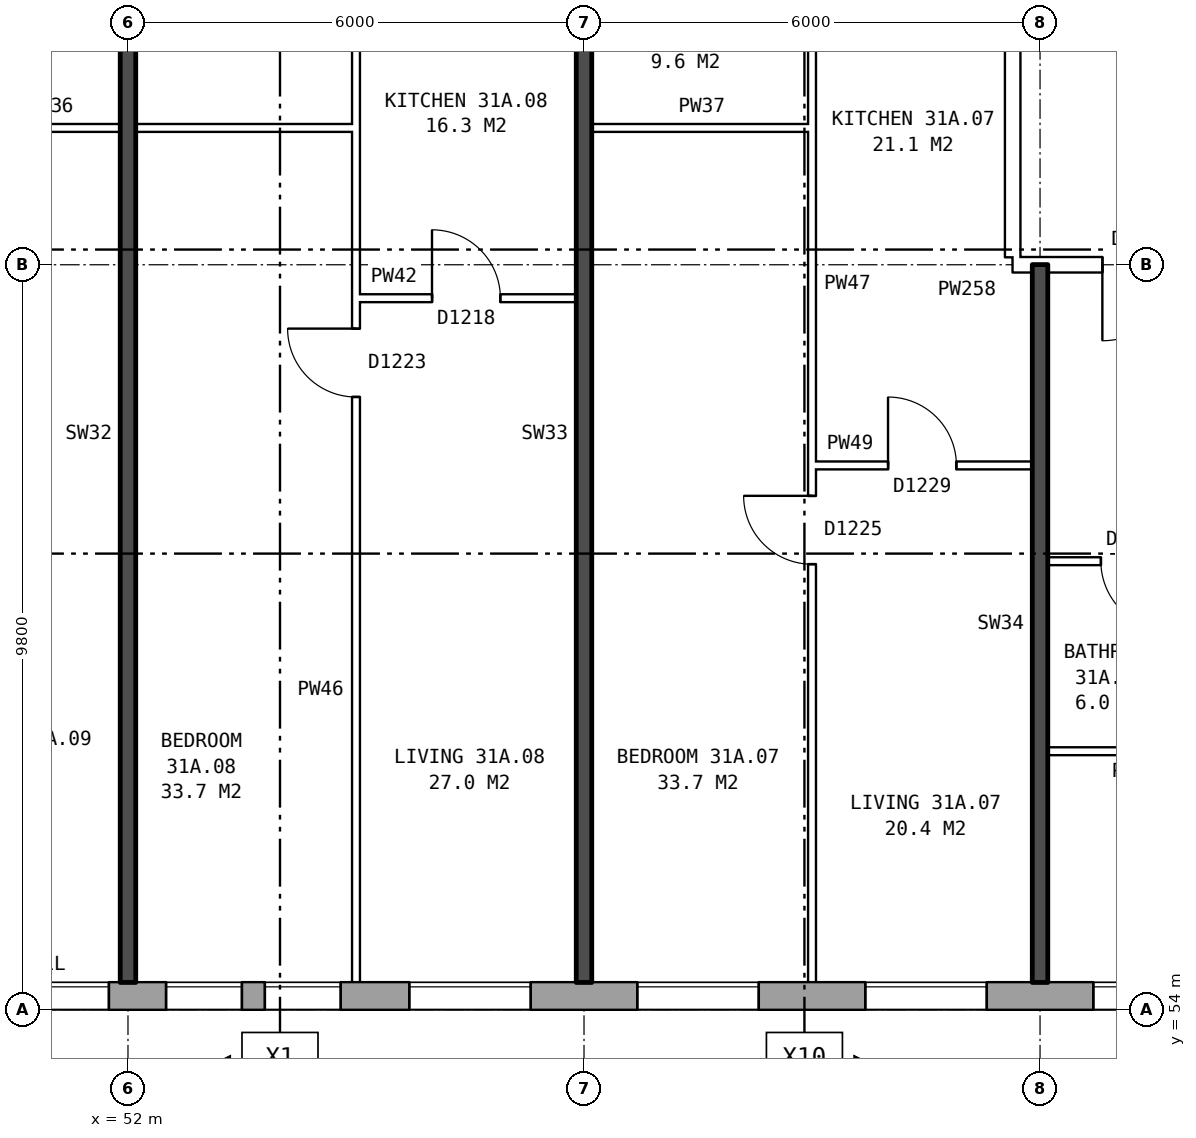
"""IFC4 building model, lengths in metres.
Left out: names, types, materials, properties, quantities, classifications, styles, units other than length and angle.
Written with IfcOpenShell. Run it as: python <this file> out.ifc"""

import sys

from ifc_helpers import new_model, si_unit, direction, frame, frame_2d, origin, place, context, subcontext, project, spatial, rectangle, extrude, element, fill, save


model = new_model("IFC4")
c1 = context("Model", 3, precision=1e-05, world=origin(), true_north=direction((0.0, 1.0)))
c2 = subcontext(c1, "Body", "Model", "MODEL_VIEW")
j1 = project(units=[si_unit("LENGTHUNIT", "METRE"), si_unit("PLANEANGLEUNIT", "RADIAN")], contexts=[c1])
p1 = place(None, origin())
s1 = spatial("IfcSite", under=j1, at=p1, CompositionType="ELEMENT")
p2 = place(p1, origin())
s2 = spatial("IfcBuilding", under=s1, at=p2, CompositionType="ELEMENT")
p3 = place(p2, frame((0.0, 0.0, 111.9)))
s3 = spatial("IfcBuildingStorey", under=s2, at=p3, CompositionType="ELEMENT", Elevation=111.9)
p4 = place(p3, frame((28.075, 54.18, 0.0), z_axis=(0.0, 0.0, 1.0), x_axis=(1.0, 0.0, 0.0)))
e1 = element("IfcWall", 1, at=p4, inside=s3, PredefinedType="STANDARD", context=c2, shape_type="SweptSolid", body=[
    extrude(rectangle(XDim=44.851, YDim=0.36, at=frame_2d((22.425, 0.0))), origin(), (0.0, 0.0, 1.0), 2.85),
])
p5 = place(p4, frame((0.625, 0.0, 0.8)))
e2 = element("IfcOpeningElement", 2, at=p5, cuts=e1, PredefinedType="OPENING", context=c2, shape_type="SweptSolid", body=[
    extrude(rectangle(XDim=1.6, YDim=1.8, at=frame_2d((0.8, 0.9))), frame((0.0, 0.19, 0.0), z_axis=(0.0, -1.0, 0.0), x_axis=(1.0, 0.0, 0.0)), (0.0, 0.0, 1.0), 0.38),
])
p6 = place(p4, frame((3.625, 0.0, 0.8)))
e3 = element("IfcOpeningElement", 3, at=p6, cuts=e1, PredefinedType="OPENING", context=c2, shape_type="SweptSolid", body=[
    extrude(rectangle(XDim=1.6, YDim=1.8, at=frame_2d((0.8, 0.9))), frame((0.0, 0.19, 0.0), z_axis=(0.0, -1.0, 0.0), x_axis=(1.0, 0.0, 0.0)), (0.0, 0.0, 1.0), 0.38),
])
p7 = place(p4, frame((6.625, 0.0, 0.8)))
e4 = element("IfcOpeningElement", 4, at=p7, cuts=e1, PredefinedType="OPENING", context=c2, shape_type="SweptSolid", body=[
    extrude(rectangle(XDim=1.6, YDim=1.8, at=frame_2d((0.8, 0.9))), frame((0.0, 0.19, 0.0), z_axis=(0.0, -1.0, 0.0), x_axis=(1.0, 0.0, 0.0)), (0.0, 0.0, 1.0), 0.38),
])
p8 = place(p4, frame((9.625, 0.0, 0.8)))
e5 = element("IfcOpeningElement", 5, at=p8, cuts=e1, PredefinedType="OPENING", context=c2, shape_type="SweptSolid", body=[
    extrude(rectangle(XDim=1.6, YDim=1.8, at=frame_2d((0.8, 0.9))), frame((0.0, 0.19, 0.0), z_axis=(0.0, -1.0, 0.0), x_axis=(1.0, 0.0, 0.0)), (0.0, 0.0, 1.0), 0.38),
])
p9 = place(p4, frame((12.625, 0.0, 0.8)))
e6 = element("IfcOpeningElement", 6, at=p9, cuts=e1, PredefinedType="OPENING", context=c2, shape_type="SweptSolid", body=[
    extrude(rectangle(XDim=1.6, YDim=1.8, at=frame_2d((0.8, 0.9))), frame((0.0, 0.19, 0.0), z_axis=(0.0, -1.0, 0.0), x_axis=(1.0, 0.0, 0.0)), (0.0, 0.0, 1.0), 0.38),
])
p10 = place(p4, frame((15.625, 0.0, 0.8)))
e7 = element("IfcOpeningElement", 7, at=p10, cuts=e1, PredefinedType="OPENING", context=c2, shape_type="SweptSolid", body=[
    extrude(rectangle(XDim=1.6, YDim=1.8, at=frame_2d((0.8, 0.9))), frame((0.0, 0.19, 0.0), z_axis=(0.0, -1.0, 0.0), x_axis=(1.0, 0.0, 0.0)), (0.0, 0.0, 1.0), 0.38),
])
p11 = place(p4, frame((18.125, 0.0, 0.8)))
e8 = element("IfcOpeningElement", 8, at=p11, cuts=e1, PredefinedType="OPENING", context=c2, shape_type="SweptSolid", body=[
    extrude(rectangle(XDim=1.0, YDim=1.8, at=frame_2d((0.5, 0.9))), frame((0.0, 0.19, 0.0), z_axis=(0.0, -1.0, 0.0), x_axis=(1.0, 0.0, 0.0)), (0.0, 0.0, 1.0), 0.38),
])
p12 = place(p4, frame((21.175, 0.0, 0.15)))
e9 = element("IfcOpeningElement", 9, at=p12, cuts=e1, PredefinedType="OPENING", context=c2, shape_type="SweptSolid", body=[
    extrude(rectangle(XDim=0.6, YDim=1.2, at=frame_2d((0.3, 0.6))), frame((0.0, 0.19, 0.0), z_axis=(0.0, -1.0, 0.0), x_axis=(1.0, 0.0, 0.0)), (0.0, 0.0, 1.0), 0.38),
])
p13 = place(p4, frame((24.425, 0.0, 1.7)))
e10 = element("IfcOpeningElement", 10, at=p13, cuts=e1, PredefinedType="OPENING", context=c2, shape_type="SweptSolid", body=[
    extrude(rectangle(XDim=1.0, YDim=0.9, at=frame_2d((0.5, 0.45))), frame((0.0, 0.19, 0.0), z_axis=(0.0, -1.0, 0.0), x_axis=(1.0, 0.0, 0.0)), (0.0, 0.0, 1.0), 0.38),
])
p14 = place(p4, frame((27.625, 0.0, 0.8)))
e11 = element("IfcOpeningElement", 11, at=p14, cuts=e1, PredefinedType="OPENING", context=c2, shape_type="SweptSolid", body=[
    extrude(rectangle(XDim=1.6, YDim=1.8, at=frame_2d((0.8, 0.9))), frame((0.0, 0.19, 0.0), z_axis=(0.0, -1.0, 0.0), x_axis=(1.0, 0.0, 0.0)), (0.0, 0.0, 1.0), 0.38),
])
p15 = place(p4, frame((30.625, 0.0, 0.8)))
e12 = element("IfcOpeningElement", 12, at=p15, cuts=e1, PredefinedType="OPENING", context=c2, shape_type="SweptSolid", body=[
    extrude(rectangle(XDim=1.6, YDim=1.8, at=frame_2d((0.8, 0.9))), frame((0.0, 0.19, 0.0), z_axis=(0.0, -1.0, 0.0), x_axis=(1.0, 0.0, 0.0)), (0.0, 0.0, 1.0), 0.38),
])
p16 = place(p4, frame((33.625, 0.0, 0.8)))
e13 = element("IfcOpeningElement", 13, at=p16, cuts=e1, PredefinedType="OPENING", context=c2, shape_type="SweptSolid", body=[
    extrude(rectangle(XDim=1.6, YDim=1.8, at=frame_2d((0.8, 0.9))), frame((0.0, 0.19, 0.0), z_axis=(0.0, -1.0, 0.0), x_axis=(1.0, 0.0, 0.0)), (0.0, 0.0, 1.0), 0.38),
])
p17 = place(p4, frame((36.625, 0.0, 0.8)))
e14 = element("IfcOpeningElement", 14, at=p17, cuts=e1, PredefinedType="OPENING", context=c2, shape_type="SweptSolid", body=[
    extrude(rectangle(XDim=1.6, YDim=1.8, at=frame_2d((0.8, 0.9))), frame((0.0, 0.19, 0.0), z_axis=(0.0, -1.0, 0.0), x_axis=(1.0, 0.0, 0.0)), (0.0, 0.0, 1.0), 0.38),
])
p18 = place(p4, frame((39.625, 0.0, 0.8)))
e15 = element("IfcOpeningElement", 15, at=p18, cuts=e1, PredefinedType="OPENING", context=c2, shape_type="SweptSolid", body=[
    extrude(rectangle(XDim=1.6, YDim=1.8, at=frame_2d((0.8, 0.9))), frame((0.0, 0.19, 0.0), z_axis=(0.0, -1.0, 0.0), x_axis=(1.0, 0.0, 0.0)), (0.0, 0.0, 1.0), 0.38),
])
p19 = place(p4, frame((42.625, 0.0, 0.8)))
e16 = element("IfcOpeningElement", 16, at=p19, cuts=e1, PredefinedType="OPENING", context=c2, shape_type="SweptSolid", body=[
    extrude(rectangle(XDim=1.6, YDim=1.8, at=frame_2d((0.8, 0.9))), frame((0.0, 0.19, 0.0), z_axis=(0.0, -1.0, 0.0), x_axis=(1.0, 0.0, 0.0)), (0.0, 0.0, 1.0), 0.38),
])
p20 = place(p4, frame((19.425, 0.0, 1.7)))
e17 = element("IfcOpeningElement", 17, at=p20, cuts=e1, PredefinedType="OPENING", context=c2, shape_type="SweptSolid", body=[
    extrude(rectangle(XDim=1.0, YDim=0.9, at=frame_2d((0.5, 0.45))), frame((0.0, 0.19, 0.0), z_axis=(0.0, -1.0, 0.0), x_axis=(1.0, 0.0, 0.0)), (0.0, 0.0, 1.0), 0.38),
])
p21 = place(p4, frame((22.075, 0.0, 0.15)))
e18 = element("IfcOpeningElement", 18, at=p21, cuts=e1, PredefinedType="OPENING", context=c2, shape_type="SweptSolid", body=[
    extrude(rectangle(XDim=1.6, YDim=1.2, at=frame_2d((0.8, 0.6))), frame((0.0, 0.19, 0.0), z_axis=(0.0, -1.0, 0.0), x_axis=(1.0, 0.0, 0.0)), (0.0, 0.0, 1.0), 0.38),
])
p22 = place(p4, frame((25.725, 0.0, 0.8)))
e19 = element("IfcOpeningElement", 19, at=p22, cuts=e1, PredefinedType="OPENING", context=c2, shape_type="SweptSolid", body=[
    extrude(rectangle(XDim=1.0, YDim=1.8, at=frame_2d((0.5, 0.9))), frame((0.0, 0.19, 0.0), z_axis=(0.0, -1.0, 0.0), x_axis=(1.0, 0.0, 0.0)), (0.0, 0.0, 1.0), 0.38),
])
p23 = place(p3, frame((63.64, 63.9, 0.0), z_axis=(0.0, 0.0, 1.0), x_axis=(0.0, 1.0, 0.0)))
e20 = element("IfcWall", 20, at=p23, inside=s3, PredefinedType="PARTITIONING", context=c2, shape_type="SweptSolid", body=[
    extrude(rectangle(XDim=12.2, YDim=0.2, at=frame_2d((6.1, 0.0))), origin(), (0.0, 0.0, 1.0), 2.85),
])
p24 = place(p23, frame((5.1, 0.0, 0.0)))
e21 = element("IfcOpeningElement", 21, at=p24, cuts=e20, PredefinedType="OPENING", context=c2, shape_type="SweptSolid", body=[
    extrude(rectangle(XDim=2.0, YDim=2.1, at=frame_2d((1.0, 1.05))), frame((0.0, 0.11, 0.0), z_axis=(0.0, -1.0, 0.0), x_axis=(1.0, 0.0, 0.0)), (0.0, 0.0, 1.0), 0.22),
])
p25 = place(p3, frame((64.1, 57.4, 0.0), z_axis=(0.0, 0.0, 1.0), x_axis=(1.0, 0.0, 0.0)))
e22 = element("IfcWall", 22, at=p25, inside=s3, PredefinedType="PARTITIONING", context=c2, shape_type="SweptSolid", body=[
    extrude(rectangle(XDim=2.3, YDim=0.1, at=frame_2d((1.15, 0.0))), origin(), (0.0, 0.0, 1.0), 2.85),
])
p26 = place(p3, frame((64.1, 59.9, 0.0), z_axis=(0.0, 0.0, 1.0), x_axis=(1.0, 0.0, 0.0)))
e23 = element("IfcWall", 23, at=p26, inside=s3, PredefinedType="PARTITIONING", context=c2, shape_type="SweptSolid", body=[
    extrude(rectangle(XDim=5.8, YDim=0.1, at=frame_2d((2.9, 0.0))), origin(), (0.0, 0.0, 1.0), 2.85),
])
p27 = place(p26, frame((3.6, 0.0, 0.0)))
e24 = element("IfcOpeningElement", 24, at=p27, cuts=e23, PredefinedType="OPENING", context=c2, shape_type="SweptSolid", body=[
    extrude(rectangle(XDim=0.9, YDim=2.1, at=frame_2d((0.45, 1.05))), frame((0.0, 0.06, 0.0), z_axis=(0.0, -1.0, 0.0), x_axis=(1.0, 0.0, 0.0)), (0.0, 0.0, 1.0), 0.12),
])
p28 = place(p26, frame((0.7, 0.0, 0.0)))
e25 = element("IfcOpeningElement", 25, at=p28, cuts=e23, PredefinedType="OPENING", context=c2, shape_type="SweptSolid", body=[
    extrude(rectangle(XDim=0.9, YDim=2.1, at=frame_2d((0.45, 1.05))), frame((0.0, 0.06, 0.0), z_axis=(0.0, -1.0, 0.0), x_axis=(1.0, 0.0, 0.0)), (0.0, 0.0, 1.0), 0.12),
])
p29 = place(p3, frame((61.0, 61.16, 0.0), z_axis=(0.0, 0.0, 1.0), x_axis=(1.0, 0.0, 0.0)))
e26 = element("IfcWall", 26, at=p29, inside=s3, PredefinedType="PARTITIONING", context=c2, shape_type="SweptSolid", body=[
    extrude(rectangle(XDim=2.9, YDim=0.1, at=frame_2d((1.45, 0.0))), origin(), (0.0, 0.0, 1.0), 2.85),
])
p30 = place(p29, frame((1.0, 0.0, 0.0)))
e27 = element("IfcOpeningElement", 27, at=p30, cuts=e26, PredefinedType="OPENING", context=c2, shape_type="SweptSolid", body=[
    extrude(rectangle(XDim=0.9, YDim=2.1, at=frame_2d((0.45, 1.05))), frame((0.0, 0.06, 0.0), z_axis=(0.0, -1.0, 0.0), x_axis=(1.0, 0.0, 0.0)), (0.0, 0.0, 1.0), 0.12),
])
p31 = place(p3, frame((55.0, 63.36, 0.0), z_axis=(0.0, 0.0, 1.0), x_axis=(1.0, 0.0, 0.0)))
e28 = element("IfcWall", 28, at=p31, inside=s3, PredefinedType="PARTITIONING", context=c2, shape_type="SweptSolid", body=[
    extrude(rectangle(XDim=2.9, YDim=0.1, at=frame_2d((1.45, 0.0))), origin(), (0.0, 0.0, 1.0), 2.85),
])
p32 = place(p31, frame((1.0, 0.0, 0.0)))
e29 = element("IfcOpeningElement", 29, at=p32, cuts=e28, PredefinedType="OPENING", context=c2, shape_type="SweptSolid", body=[
    extrude(rectangle(XDim=0.9, YDim=2.1, at=frame_2d((0.45, 1.05))), frame((0.0, 0.06, 0.0), z_axis=(0.0, -1.0, 0.0), x_axis=(1.0, 0.0, 0.0)), (0.0, 0.0, 1.0), 0.12),
])
p33 = place(p3, frame((63.64, 63.8, 0.0), z_axis=(0.0, 0.0, 1.0), x_axis=(1.0, 0.0, 0.0)))
e30 = element("IfcWall", 30, at=p33, inside=s3, PredefinedType="PARTITIONING", context=c2, shape_type="SweptSolid", body=[
    extrude(rectangle(XDim=3.0, YDim=0.2, at=frame_2d((1.5, 0.0))), origin(), (0.0, 0.0, 1.0), 2.85),
])
p34 = place(p33, frame((1.18, 0.0, 0.0)))
e31 = element("IfcOpeningElement", 31, at=p34, cuts=e30, PredefinedType="OPENING", context=c2, shape_type="SweptSolid", body=[
    extrude(rectangle(XDim=1.0, YDim=2.1, at=frame_2d((0.5, 1.05))), frame((0.0, 0.11, 0.0), z_axis=(0.0, -1.0, 0.0), x_axis=(1.0, 0.0, 0.0)), (0.0, 0.0, 1.0), 0.22),
])
p35 = place(p3, frame((49.0, 65.6, 0.0), z_axis=(0.0, 0.0, 1.0), x_axis=(1.0, 0.0, 0.0)))
e32 = element("IfcWall", 32, at=p35, inside=s3, PredefinedType="PARTITIONING", context=c2, shape_type="SweptSolid", body=[
    extrude(rectangle(XDim=6.0, YDim=0.1, at=frame_2d((3.0, 0.0))), origin(), (0.0, 0.0, 1.0), 2.85),
])
p36 = place(p3, frame((58.1, 65.6, 0.0), z_axis=(0.0, 0.0, 1.0), x_axis=(1.0, 0.0, 0.0)))
e33 = element("IfcWall", 33, at=p36, inside=s3, PredefinedType="PARTITIONING", context=c2, shape_type="SweptSolid", body=[
    extrude(rectangle(XDim=2.9, YDim=0.1, at=frame_2d((1.45, 0.0))), origin(), (0.0, 0.0, 1.0), 2.85),
])
p37 = place(p3, frame((52.0, 54.36, 0.0), z_axis=(0.0, 0.0, 1.0), x_axis=(0.0, 1.0, 0.0)))
e34 = element("IfcWall", 34, at=p37, inside=s3, PredefinedType="SOLIDWALL", context=c2, shape_type="SweptSolid", body=[
    extrude(rectangle(XDim=14.44, YDim=0.2, at=frame_2d((7.22, 0.0))), origin(), (0.0, 0.0, 1.0), 2.85),
])
p38 = place(p3, frame((55.0, 54.36, 0.0), z_axis=(0.0, 0.0, 1.0), x_axis=(0.0, 1.0, 0.0)))
e35 = element("IfcWall", 35, at=p38, inside=s3, PredefinedType="PARTITIONING", context=c2, shape_type="SweptSolid", body=[
    extrude(rectangle(XDim=14.34, YDim=0.1, at=frame_2d((7.17, 0.0))), origin(), (0.0, 0.0, 1.0), 2.85),
])
p39 = place(p38, frame((7.7, 0.0, 0.0)))
e36 = element("IfcOpeningElement", 36, at=p39, cuts=e35, PredefinedType="OPENING", context=c2, shape_type="SweptSolid", body=[
    extrude(rectangle(XDim=0.9, YDim=2.1, at=frame_2d((0.45, 1.05))), frame((0.0, 0.06, 0.0), z_axis=(0.0, -1.0, 0.0), x_axis=(1.0, 0.0, 0.0)), (0.0, 0.0, 1.0), 0.12),
])
p40 = place(p38, frame((13.04, 0.0, 0.0)))
e37 = element("IfcOpeningElement", 37, at=p40, cuts=e35, PredefinedType="OPENING", context=c2, shape_type="SweptSolid", body=[
    extrude(rectangle(XDim=0.9, YDim=2.1, at=frame_2d((0.45, 1.05))), frame((0.0, 0.06, 0.0), z_axis=(0.0, -1.0, 0.0), x_axis=(1.0, 0.0, 0.0)), (0.0, 0.0, 1.0), 0.12),
])
p41 = place(p3, frame((58.0, 54.36, 0.0), z_axis=(0.0, 0.0, 1.0), x_axis=(0.0, 1.0, 0.0)))
e38 = element("IfcWall", 38, at=p41, inside=s3, PredefinedType="SOLIDWALL", context=c2, shape_type="SweptSolid", body=[
    extrude(rectangle(XDim=14.44, YDim=0.2, at=frame_2d((7.22, 0.0))), origin(), (0.0, 0.0, 1.0), 2.85),
])
p42 = place(p3, frame((61.0, 54.36, 0.0), z_axis=(0.0, 0.0, 1.0), x_axis=(0.0, 1.0, 0.0)))
e39 = element("IfcWall", 39, at=p42, inside=s3, PredefinedType="PARTITIONING", context=c2, shape_type="SweptSolid", body=[
    extrude(rectangle(XDim=14.34, YDim=0.1, at=frame_2d((7.17, 0.0))), origin(), (0.0, 0.0, 1.0), 2.85),
])
p43 = place(p42, frame((5.5, 0.0, 0.0)))
e40 = element("IfcOpeningElement", 40, at=p43, cuts=e39, PredefinedType="OPENING", context=c2, shape_type="SweptSolid", body=[
    extrude(rectangle(XDim=0.9, YDim=2.1, at=frame_2d((0.45, 1.05))), frame((0.0, 0.06, 0.0), z_axis=(0.0, -1.0, 0.0), x_axis=(1.0, 0.0, 0.0)), (0.0, 0.0, 1.0), 0.12),
])
p44 = place(p42, frame((12.54, 0.0, 0.0)))
e41 = element("IfcOpeningElement", 41, at=p44, cuts=e39, PredefinedType="OPENING", context=c2, shape_type="SweptSolid", body=[
    extrude(rectangle(XDim=0.9, YDim=2.1, at=frame_2d((0.45, 1.05))), frame((0.0, 0.06, 0.0), z_axis=(0.0, -1.0, 0.0), x_axis=(1.0, 0.0, 0.0)), (0.0, 0.0, 1.0), 0.12),
])
p45 = place(p3, frame((64.0, 54.36, 0.0), z_axis=(0.0, 0.0, 1.0), x_axis=(0.0, 1.0, 0.0)))
e42 = element("IfcWall", 42, at=p45, inside=s3, PredefinedType="SOLIDWALL", context=c2, shape_type="SweptSolid", body=[
    extrude(rectangle(XDim=9.44, YDim=0.2, at=frame_2d((4.72, 0.0))), origin(), (0.0, 0.0, 1.0), 2.85),
])
p46 = place(p13, origin())
e43 = element("IfcWindow", 43, at=p46, inside=s3, PartitioningType="SINGLE_PANEL", PredefinedType="WINDOW", context=c2, shape_type="SweptSolid", body=[
    extrude(rectangle(XDim=1.0, YDim=0.9, at=frame_2d((0.5, 0.45))), frame((0.0, 0.15, 0.0), z_axis=(0.0, -1.0, 0.0), x_axis=(1.0, 0.0, 0.0)), (0.0, 0.0, 1.0), 0.06),
])
fill(e10, e43)
p47 = place(p14, origin())
e44 = element("IfcWindow", 44, at=p47, inside=s3, PartitioningType="SINGLE_PANEL", PredefinedType="WINDOW", context=c2, shape_type="SweptSolid", body=[
    extrude(rectangle(XDim=1.6, YDim=1.8, at=frame_2d((0.8, 0.9))), frame((0.0, 0.15, 0.0), z_axis=(0.0, -1.0, 0.0), x_axis=(1.0, 0.0, 0.0)), (0.0, 0.0, 1.0), 0.06),
])
fill(e11, e44)
p48 = place(p15, origin())
e45 = element("IfcWindow", 45, at=p48, inside=s3, PartitioningType="SINGLE_PANEL", PredefinedType="WINDOW", context=c2, shape_type="SweptSolid", body=[
    extrude(rectangle(XDim=1.6, YDim=1.8, at=frame_2d((0.8, 0.9))), frame((0.0, 0.15, 0.0), z_axis=(0.0, -1.0, 0.0), x_axis=(1.0, 0.0, 0.0)), (0.0, 0.0, 1.0), 0.06),
])
fill(e12, e45)
p49 = place(p16, origin())
e46 = element("IfcWindow", 46, at=p49, inside=s3, PartitioningType="SINGLE_PANEL", PredefinedType="WINDOW", context=c2, shape_type="SweptSolid", body=[
    extrude(rectangle(XDim=1.6, YDim=1.8, at=frame_2d((0.8, 0.9))), frame((0.0, 0.15, 0.0), z_axis=(0.0, -1.0, 0.0), x_axis=(1.0, 0.0, 0.0)), (0.0, 0.0, 1.0), 0.06),
])
fill(e13, e46)
p50 = place(p17, origin())
e47 = element("IfcWindow", 47, at=p50, inside=s3, PartitioningType="SINGLE_PANEL", PredefinedType="WINDOW", context=c2, shape_type="SweptSolid", body=[
    extrude(rectangle(XDim=1.6, YDim=1.8, at=frame_2d((0.8, 0.9))), frame((0.0, 0.15, 0.0), z_axis=(0.0, -1.0, 0.0), x_axis=(1.0, 0.0, 0.0)), (0.0, 0.0, 1.0), 0.06),
])
fill(e14, e47)
p51 = place(p34, frame((1.0, 0.0, 0.0), z_axis=(0.0, 0.0, 1.0), x_axis=(-1.0, 0.0, 0.0)))
e48 = element("IfcDoor", 48, at=p51, inside=s3, OperationType="SINGLE_SWING_RIGHT", PredefinedType="DOOR", context=c2, shape_type="SweptSolid", body=[
    extrude(rectangle(XDim=1.0, YDim=2.1, at=frame_2d((0.5, 1.05))), frame((0.0, 0.025, 0.0), z_axis=(0.0, -1.0, 0.0), x_axis=(1.0, 0.0, 0.0)), (0.0, 0.0, 1.0), 0.05),
])
fill(e31, e48)
p52 = place(p28, frame((0.9, 0.0, 0.0), z_axis=(0.0, 0.0, 1.0), x_axis=(-1.0, 0.0, 0.0)))
e49 = element("IfcDoor", 49, at=p52, inside=s3, OperationType="SINGLE_SWING_LEFT", PredefinedType="DOOR", context=c2, shape_type="SweptSolid", body=[
    extrude(rectangle(XDim=0.9, YDim=2.1, at=frame_2d((0.45, 1.05))), frame((0.0, 0.025, 0.0), z_axis=(0.0, -1.0, 0.0), x_axis=(1.0, 0.0, 0.0)), (0.0, 0.0, 1.0), 0.05),
])
fill(e25, e49)
p53 = place(p43, origin())
e50 = element("IfcDoor", 50, at=p53, inside=s3, OperationType="SINGLE_SWING_RIGHT", PredefinedType="DOOR", context=c2, shape_type="SweptSolid", body=[
    extrude(rectangle(XDim=0.9, YDim=2.1, at=frame_2d((0.45, 1.05))), frame((0.0, 0.025, 0.0), z_axis=(0.0, -1.0, 0.0), x_axis=(1.0, 0.0, 0.0)), (0.0, 0.0, 1.0), 0.05),
])
fill(e40, e50)
p54 = place(p30, origin())
e51 = element("IfcDoor", 51, at=p54, inside=s3, OperationType="SINGLE_SWING_LEFT", PredefinedType="DOOR", context=c2, shape_type="SweptSolid", body=[
    extrude(rectangle(XDim=0.9, YDim=2.1, at=frame_2d((0.45, 1.05))), frame((0.0, 0.025, 0.0), z_axis=(0.0, -1.0, 0.0), x_axis=(1.0, 0.0, 0.0)), (0.0, 0.0, 1.0), 0.05),
])
fill(e27, e51)
p55 = place(p39, origin())
e52 = element("IfcDoor", 52, at=p55, inside=s3, OperationType="SINGLE_SWING_RIGHT", PredefinedType="DOOR", context=c2, shape_type="SweptSolid", body=[
    extrude(rectangle(XDim=0.9, YDim=2.1, at=frame_2d((0.45, 1.05))), frame((0.0, 0.025, 0.0), z_axis=(0.0, -1.0, 0.0), x_axis=(1.0, 0.0, 0.0)), (0.0, 0.0, 1.0), 0.05),
])
fill(e36, e52)
p56 = place(p32, origin())
e53 = element("IfcDoor", 53, at=p56, inside=s3, OperationType="SINGLE_SWING_LEFT", PredefinedType="DOOR", context=c2, shape_type="SweptSolid", body=[
    extrude(rectangle(XDim=0.9, YDim=2.1, at=frame_2d((0.45, 1.05))), frame((0.0, 0.025, 0.0), z_axis=(0.0, -1.0, 0.0), x_axis=(1.0, 0.0, 0.0)), (0.0, 0.0, 1.0), 0.05),
])
fill(e29, e53)
p57 = place(p21, origin())
e54 = element("IfcWindow", 54, at=p57, inside=s3, PartitioningType="SINGLE_PANEL", PredefinedType="WINDOW", context=c2, shape_type="SweptSolid", body=[
    extrude(rectangle(XDim=1.6, YDim=1.2, at=frame_2d((0.8, 0.6))), frame((0.0, 0.15, 0.0), z_axis=(0.0, -1.0, 0.0), x_axis=(1.0, 0.0, 0.0)), (0.0, 0.0, 1.0), 0.06),
])
fill(e18, e54)
p58 = place(p22, origin())
e55 = element("IfcWindow", 55, at=p58, inside=s3, PartitioningType="SINGLE_PANEL", PredefinedType="WINDOW", context=c2, shape_type="SweptSolid", body=[
    extrude(rectangle(XDim=1.0, YDim=1.8, at=frame_2d((0.5, 0.9))), frame((0.0, 0.15, 0.0), z_axis=(0.0, -1.0, 0.0), x_axis=(1.0, 0.0, 0.0)), (0.0, 0.0, 1.0), 0.06),
])
fill(e19, e55)
save(model, sys.argv[1])
